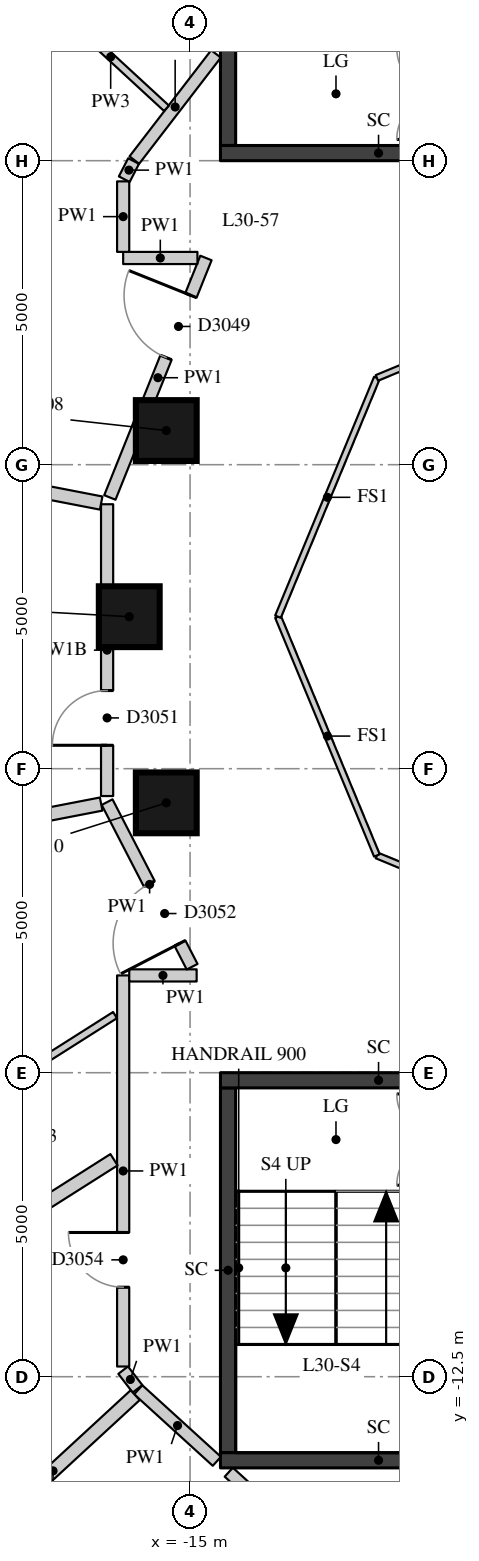
"""IFC4 building model, lengths in metres.
Left out: names, types, materials, properties, quantities, classifications, styles, units other than length and angle.
Written with IfcOpenShell. Run it as: python <this file> out.ifc"""

import sys

from ifc_helpers import new_model, si_unit, direction, frame, frame_2d, origin, origin_2d, place, context, subcontext, project, spatial, rectangle, extrude, element, fill, save


model = new_model("IFC4")
c1 = context("Model", 3, precision=1e-05, world=origin(), true_north=direction((0.0, 1.0)))
c2 = subcontext(c1, "Body", "Model", "MODEL_VIEW")
j1 = project(units=[si_unit("LENGTHUNIT", "METRE"), si_unit("PLANEANGLEUNIT", "RADIAN")], contexts=[c1])
p1 = place(None, origin())
s1 = spatial("IfcSite", under=j1, at=p1, CompositionType="ELEMENT")
p2 = place(p1, origin())
s2 = spatial("IfcBuilding", under=s1, at=p2, CompositionType="ELEMENT")
p3 = place(p2, frame((0.0, 0.0, 108.7)))
s3 = spatial("IfcBuildingStorey", under=s2, at=p3, CompositionType="ELEMENT", Elevation=108.7)
for number, where, z_axis, x_axis in (
    (1, (-15.391, 3.062, 0.0), (0.0, 0.0, 1.0), (1.0, 0.0, 0.0)),
    (2, (-16.0, 0.0, 0.0), (0.0, 0.0, 1.0), (1.0, 0.0, 0.0)),
    (3, (-15.391, -3.062, 0.0), (0.0, 0.0, 1.0), (1.0, 0.0, 0.0)),
):
    element("IfcColumn", number, at=place(p3, frame(where, z_axis=z_axis, x_axis=x_axis)), inside=s3, PredefinedType="COLUMN", context=c2, shape_type="SweptSolid", body=[
        extrude(rectangle(XDim=1.0, YDim=1.0, at=origin_2d()), origin(), (0.0, 0.0, 1.0), 3.3),
    ])
p4 = place(p3, frame((-14.375, 7.75, -0.28), z_axis=(0.0, 0.0, 1.0), x_axis=(0.0, 1.0, 0.0)))
e4 = element("IfcWall", 4, at=p4, inside=s3, PredefinedType="SHEAR", context=c2, shape_type="SweptSolid", body=[
    extrude(rectangle(XDim=6.0, YDim=0.25, at=frame_2d((3.0, 0.0))), origin(), (0.0, 0.0, 1.0), 3.3),
])
p5 = place(p3, frame((-14.5, 7.625, -0.28), z_axis=(0.0, 0.0, 1.0), x_axis=(1.0, 0.0, 0.0)))
e5 = element("IfcWall", 5, at=p5, inside=s3, PredefinedType="SHEAR", context=c2, shape_type="SweptSolid", body=[
    extrude(rectangle(XDim=5.2, YDim=0.25, at=frame_2d((2.6, 0.0))), origin(), (0.0, 0.0, 1.0), 3.3),
])
p6 = place(p3, frame((-14.375, -13.75, -0.28), z_axis=(0.0, 0.0, 1.0), x_axis=(0.0, 1.0, 0.0)))
e6 = element("IfcWall", 6, at=p6, inside=s3, PredefinedType="SHEAR", context=c2, shape_type="SweptSolid", body=[
    extrude(rectangle(XDim=6.0, YDim=0.25, at=frame_2d((3.0, 0.0))), origin(), (0.0, 0.0, 1.0), 3.3),
])
for number, where, z_axis, x_axis in (
    (7, (-14.5, -7.625, -0.28), (0.0, 0.0, 1.0), (1.0, 0.0, 0.0)),
    (8, (-14.5, -13.875, -0.28), (0.0, 0.0, 1.0), (1.0, 0.0, 0.0)),
):
    element("IfcWall", number, at=place(p3, frame(where, z_axis=z_axis, x_axis=x_axis)), inside=s3, PredefinedType="SHEAR", context=c2, shape_type="SweptSolid", body=[
        extrude(rectangle(XDim=5.2, YDim=0.25, at=frame_2d((2.6, 0.0))), origin(), (0.0, 0.0, 1.0), 3.3),
    ])
p7 = place(p3, frame((-14.56, -13.891, 0.0), z_axis=(0.0, 0.0, 1.0), x_axis=(-0.739440483737, 0.673221932954, 0.0)))
e9 = element("IfcWall", 9, at=p7, inside=s3, PredefinedType="PARTITIONING", context=c2, shape_type="SweptSolid", body=[
    extrude(rectangle(XDim=1.748, YDim=0.2, at=frame_2d((0.874, 0.0))), origin(), (0.0, 0.0, 1.0), 3.02),
])
p8 = place(p3, frame((-15.864, -12.699, 0.0), z_axis=(0.0, 0.0, 1.0), x_axis=(-0.61004607296, 0.792365943782, 0.0)))
e10 = element("IfcWall", 10, at=p8, inside=s3, PredefinedType="PARTITIONING", context=c2, shape_type="SweptSolid", body=[
    extrude(rectangle(XDim=0.387, YDim=0.2, at=frame_2d((0.193, 0.0))), origin(), (0.0, 0.0, 1.0), 3.02),
])
p9 = place(p3, frame((-16.1, -12.332, 0.0), z_axis=(0.0, 0.0, 1.0), x_axis=(0.0, 1.0, 0.0)))
e11 = element("IfcWall", 11, at=p9, inside=s3, PredefinedType="PARTITIONING", context=c2, shape_type="SweptSolid", body=[
    extrude(rectangle(XDim=6.432, YDim=0.2, at=frame_2d((3.216, 0.0))), origin(), (0.0, 0.0, 1.0), 3.02),
])
p10 = place(p9, frame((1.304, 0.0, 0.0)))
e12 = element("IfcOpeningElement", 12, at=p10, cuts=e11, PredefinedType="OPENING", context=c2, shape_type="SweptSolid", body=[
    extrude(rectangle(XDim=0.9, YDim=2.1, at=frame_2d((0.45, 1.05))), frame((0.0, 0.11, 0.0), z_axis=(0.0, -1.0, 0.0), x_axis=(1.0, 0.0, 0.0)), (0.0, 0.0, 1.0), 0.22),
])
p11 = place(p3, frame((-16.0, -5.9, 0.0), z_axis=(0.0, 0.0, 1.0), x_axis=(1.0, 0.0, 0.0)))
e13 = element("IfcWall", 13, at=p11, inside=s3, PredefinedType="PARTITIONING", context=c2, shape_type="SweptSolid", body=[
    extrude(rectangle(XDim=1.108, YDim=0.2, at=frame_2d((0.554, 0.0))), origin(), (0.0, 0.0, 1.0), 3.02),
])
p12 = place(p3, frame((-14.966, -5.757, 0.0), z_axis=(0.0, 0.0, 1.0), x_axis=(-0.458904116107, 0.888485797422, 0.0)))
e14 = element("IfcWall", 14, at=p12, inside=s3, PredefinedType="PARTITIONING", context=c2, shape_type="SweptSolid", body=[
    extrude(rectangle(XDim=3.047, YDim=0.2, at=frame_2d((1.524, 0.0))), origin(), (0.0, 0.0, 1.0), 3.02),
])
p13 = place(p12, frame((0.435, 0.0, 0.0)))
e15 = element("IfcOpeningElement", 15, at=p13, cuts=e14, PredefinedType="OPENING", context=c2, shape_type="SweptSolid", body=[
    extrude(rectangle(XDim=1.1, YDim=2.1, at=frame_2d((0.55, 1.05))), frame((0.0, 0.11, 0.0), z_axis=(0.0, -1.0, 0.0), x_axis=(1.0, 0.0, 0.0)), (0.0, 0.0, 1.0), 0.22),
])
p14 = place(p3, frame((-16.364, -2.95, 0.0), z_axis=(0.0, 0.0, 1.0), x_axis=(0.0, 1.0, 0.0)))
e16 = element("IfcWall", 16, at=p14, inside=s3, PredefinedType="PARTITIONING", context=c2, shape_type="SweptSolid", body=[
    extrude(rectangle(XDim=4.799, YDim=0.2, at=frame_2d((2.4, 0.0))), origin(), (0.0, 0.0, 1.0), 2.52),
])
p15 = place(p14, frame((0.835, 0.0, 0.0)))
e17 = element("IfcOpeningElement", 17, at=p15, cuts=e16, PredefinedType="OPENING", context=c2, shape_type="SweptSolid", body=[
    extrude(rectangle(XDim=0.9, YDim=2.1, at=frame_2d((0.45, 1.05))), frame((0.0, 0.11, 0.0), z_axis=(0.0, -1.0, 0.0), x_axis=(1.0, 0.0, 0.0)), (0.0, 0.0, 1.0), 0.22),
])
p16 = place(p3, frame((-16.319, 1.961, 0.0), z_axis=(0.0, 0.0, 1.0), x_axis=(0.372352515432, 0.928091377102, 0.0)))
e18 = element("IfcWall", 18, at=p16, inside=s3, PredefinedType="PARTITIONING", context=c2, shape_type="SweptSolid", body=[
    extrude(rectangle(XDim=4.244, YDim=0.2, at=frame_2d((2.122, 0.0))), origin(), (0.0, 0.0, 1.0), 3.02),
])
p17 = place(p16, frame((2.481, 0.0, 0.0)))
e19 = element("IfcOpeningElement", 19, at=p17, cuts=e18, PredefinedType="OPENING", context=c2, shape_type="SweptSolid", body=[
    extrude(rectangle(XDim=1.1, YDim=2.1, at=frame_2d((0.55, 1.05))), frame((0.0, 0.11, 0.0), z_axis=(0.0, -1.0, 0.0), x_axis=(1.0, 0.0, 0.0)), (0.0, 0.0, 1.0), 0.22),
])
p18 = place(p3, frame((-14.879, 5.9, 0.0), z_axis=(0.0, 0.0, 1.0), x_axis=(-1.0, 0.0, 0.0)))
e20 = element("IfcWall", 20, at=p18, inside=s3, PredefinedType="PARTITIONING", context=c2, shape_type="SweptSolid", body=[
    extrude(rectangle(XDim=1.221, YDim=0.2, at=frame_2d((0.611, 0.0))), origin(), (0.0, 0.0, 1.0), 3.02),
])
p19 = place(p3, frame((-16.1, 6.0, 0.0), z_axis=(0.0, 0.0, 1.0), x_axis=(0.0, 1.0, 0.0)))
e21 = element("IfcWall", 21, at=p19, inside=s3, PredefinedType="PARTITIONING", context=c2, shape_type="SweptSolid", body=[
    extrude(rectangle(XDim=1.16, YDim=0.2, at=frame_2d((0.58, 0.0))), origin(), (0.0, 0.0, 1.0), 3.02),
])
p20 = place(p3, frame((-16.082, 7.196, 0.0), z_axis=(0.0, 0.0, 1.0), x_axis=(0.456789128428, 0.889575006478, 0.0)))
e22 = element("IfcWall", 22, at=p20, inside=s3, PredefinedType="PARTITIONING", context=c2, shape_type="SweptSolid", body=[
    extrude(rectangle(XDim=0.336, YDim=0.2, at=frame_2d((0.168, 0.0))), origin(), (0.0, 0.0, 1.0), 3.02),
])
p21 = place(p3, frame((-15.917, 7.51, 0.0), z_axis=(0.0, 0.0, 1.0), x_axis=(0.609673267649, 0.792652828617, 0.0)))
e23 = element("IfcWall", 23, at=p21, inside=s3, PredefinedType="PARTITIONING", context=c2, shape_type="SweptSolid", body=[
    extrude(rectangle(XDim=2.203, YDim=0.2, at=frame_2d((1.102, 0.0))), origin(), (0.0, 0.0, 1.0), 3.02),
])
p22 = place(p3, frame((-13.24, -15.093, 0.0), z_axis=(0.0, 0.0, 1.0), x_axis=(-0.739438095557, 0.673224556028, 0.0)))
e24 = element("IfcWall", 24, at=p22, inside=s3, PredefinedType="PARTITIONING", context=c2, shape_type="SweptSolid", body=[
    extrude(rectangle(XDim=1.519, YDim=0.2, at=frame_2d((0.76, 0.0))), origin(), (0.0, 0.0, 1.0), 3.02),
])
p23 = place(p3, frame((-22.793, 3.095, 0.0), z_axis=(0.0, 0.0, 1.0), x_axis=(0.981772102901, -0.190061931918, 0.0)))
e25 = element("IfcWall", 25, at=p23, inside=s3, PredefinedType="PARTITIONING", context=c2, shape_type="SweptSolid", body=[
    extrude(rectangle(XDim=6.448, YDim=0.22, at=frame_2d((3.224, 0.0))), origin(), (0.0, 0.0, 1.0), 2.47),
])
p24 = place(p3, frame((-24.118, -4.564, 0.0), z_axis=(0.0, 0.0, 1.0), x_axis=(0.981765151757, 0.190097834799, 0.0)))
e26 = element("IfcWall", 26, at=p24, inside=s3, PredefinedType="PARTITIONING", context=c2, shape_type="SweptSolid", body=[
    extrude(rectangle(XDim=7.798, YDim=0.22, at=frame_2d((3.899, 0.0))), origin(), (0.0, 0.0, 1.0), 2.47),
])
p25 = place(p3, frame((-21.126, -12.023, 0.0), z_axis=(0.0, 0.0, 1.0), x_axis=(0.844499715613, 0.535556001114, 0.0)))
e27 = element("IfcWall", 27, at=p25, inside=s3, PredefinedType="PARTITIONING", context=c2, shape_type="SweptSolid", body=[
    extrude(rectangle(XDim=5.773, YDim=0.22, at=frame_2d((2.887, 0.0))), origin(), (0.0, 0.0, 1.0), 3.02),
])
p26 = place(p3, frame((-18.604, -15.294, 0.0), z_axis=(0.0, 0.0, 1.0), x_axis=(0.73529495628, 0.677747244383, 0.0)))
e28 = element("IfcWall", 28, at=p26, inside=s3, PredefinedType="PARTITIONING", context=c2, shape_type="SweptSolid", body=[
    extrude(rectangle(XDim=3.674, YDim=0.22, at=frame_2d((1.837, 0.0))), origin(), (0.0, 0.0, 1.0), 2.57),
])
p27 = place(p3, frame((-15.387, 8.362, 0.0), z_axis=(0.0, 0.0, 1.0), x_axis=(-0.735313004993, 0.677727662626, 0.0)))
e29 = element("IfcWall", 29, at=p27, inside=s3, PredefinedType="PARTITIONING", context=c2, shape_type="SweptSolid", body=[
    extrude(rectangle(XDim=2.497, YDim=0.12, at=frame_2d((1.249, 0.0))), origin(), (0.0, 0.0, 1.0), 3.02),
])
p28 = place(p3, frame((-16.234, -6.552, 0.0), z_axis=(0.0, 0.0, 1.0), x_axis=(-0.844514089089, -0.535533335406, 0.0)))
e30 = element("IfcWall", 30, at=p28, inside=s3, PredefinedType="PARTITIONING", context=c2, shape_type="SweptSolid", body=[
    extrude(rectangle(XDim=3.91, YDim=0.12, at=frame_2d((1.955, 0.0))), origin(), (0.0, 0.0, 1.0), 3.02),
])
for number, where, z_axis, x_axis in (
    (31, (-8.0, -5.554, 0.0), (0.0, 0.0, 1.0), (-0.924, 0.383, 0.0)),
    (32, (-11.927, -3.927, 0.0), (0.0, 0.0, 1.0), (-0.383, 0.924, 0.0)),
    (33, (-13.554, 0.0, 0.0), (0.0, 0.0, 1.0), (0.383, 0.924, 0.0)),
    (34, (-11.927, 3.927, 0.0), (0.0, 0.0, 1.0), (0.924, 0.383, 0.0)),
):
    element("IfcWall", number, at=place(p3, frame(where, z_axis=z_axis, x_axis=x_axis)), inside=s3, PredefinedType="PARTITIONING", context=c2, shape_type="SweptSolid", body=[
        extrude(rectangle(XDim=4.251, YDim=0.1, at=frame_2d((2.125, 0.0))), origin(), (0.0, 0.0, 1.0), 3.02),
    ])
p29 = place(p17, origin())
e35 = element("IfcDoor", 35, at=p29, inside=s3, OperationType="SINGLE_SWING_RIGHT", PredefinedType="DOOR", context=c2, shape_type="SweptSolid", body=[
    extrude(rectangle(XDim=1.1, YDim=2.1, at=frame_2d((0.55, 1.05))), frame((0.0, 0.025, 0.0), z_axis=(0.0, -1.0, 0.0), x_axis=(1.0, 0.0, 0.0)), (0.0, 0.0, 1.0), 0.05),
])
fill(e19, e35)
p30 = place(p15, origin())
e36 = element("IfcDoor", 36, at=p30, inside=s3, OperationType="SINGLE_SWING_LEFT", PredefinedType="DOOR", context=c2, shape_type="SweptSolid", body=[
    extrude(rectangle(XDim=0.9, YDim=2.1, at=frame_2d((0.45, 1.05))), frame((0.0, 0.025, 0.0), z_axis=(0.0, -1.0, 0.0), x_axis=(1.0, 0.0, 0.0)), (0.0, 0.0, 1.0), 0.05),
])
fill(e17, e36)
p31 = place(p13, origin())
e37 = element("IfcDoor", 37, at=p31, inside=s3, OperationType="SINGLE_SWING_LEFT", PredefinedType="DOOR", context=c2, shape_type="SweptSolid", body=[
    extrude(rectangle(XDim=1.1, YDim=2.1, at=frame_2d((0.55, 1.05))), frame((0.0, 0.025, 0.0), z_axis=(0.0, -1.0, 0.0), x_axis=(1.0, 0.0, 0.0)), (0.0, 0.0, 1.0), 0.05),
])
fill(e15, e37)
p32 = place(p10, origin())
e38 = element("IfcDoor", 38, at=p32, inside=s3, OperationType="SINGLE_SWING_RIGHT", PredefinedType="DOOR", context=c2, shape_type="SweptSolid", body=[
    extrude(rectangle(XDim=0.9, YDim=2.1, at=frame_2d((0.45, 1.05))), frame((0.0, 0.025, 0.0), z_axis=(0.0, -1.0, 0.0), x_axis=(1.0, 0.0, 0.0)), (0.0, 0.0, 1.0), 0.05),
])
fill(e12, e38)
save(model, sys.argv[1])
